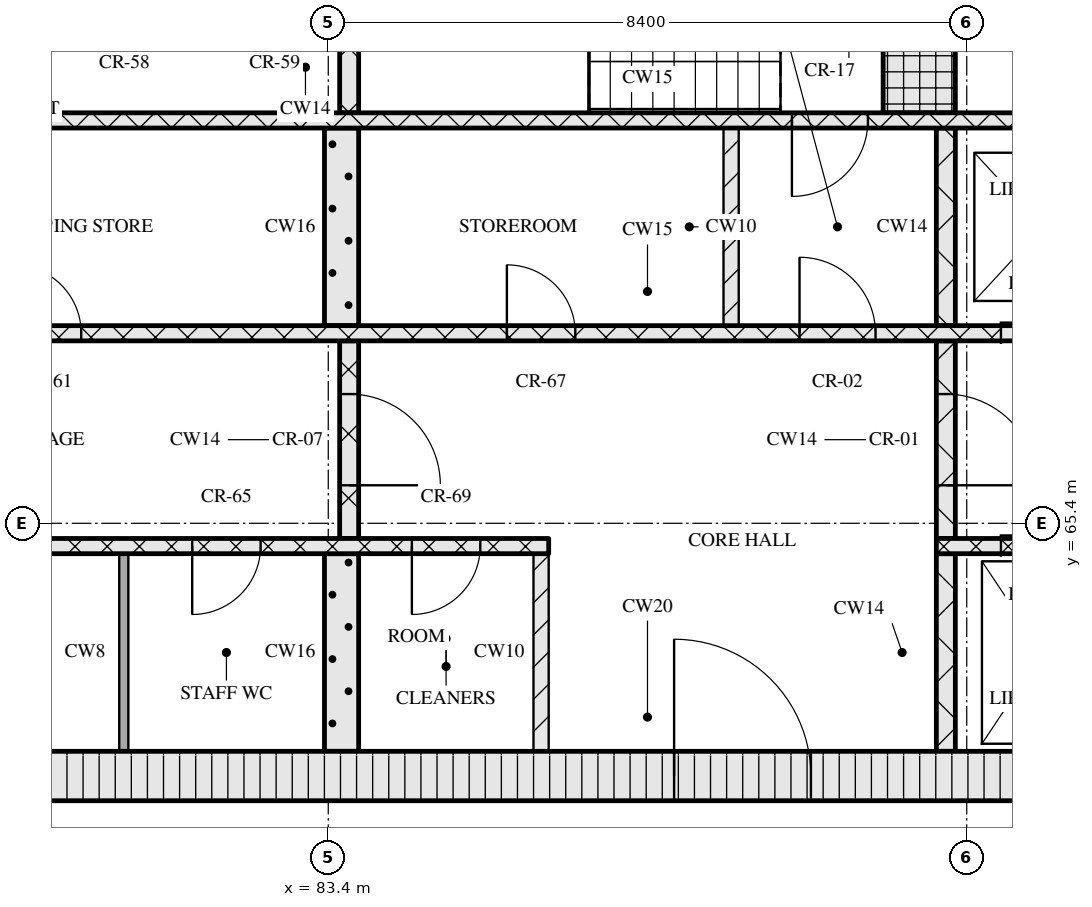
"""IFC4 building model, lengths in metres.
Left out: names, types, materials, properties, quantities, classifications, styles, units other than length and angle.
Written with IfcOpenShell. Run it as: python <this file> out.ifc"""

import sys

from ifc_helpers import new_model, si_unit, direction, frame, frame_2d, origin, place, context, subcontext, project, spatial, rectangle, extrude, element, fill, save


model = new_model("IFC4")
c1 = context("Model", 3, precision=1e-05, world=origin(), true_north=direction((0.0, 1.0)))
c2 = subcontext(c1, "Body", "Model", "MODEL_VIEW")
j1 = project(units=[si_unit("LENGTHUNIT", "METRE"), si_unit("PLANEANGLEUNIT", "RADIAN")], contexts=[c1])
p1 = place(None, origin())
s1 = spatial("IfcSite", under=j1, at=p1, CompositionType="ELEMENT")
p2 = place(p1, origin())
s2 = spatial("IfcBuilding", under=s1, at=p2, CompositionType="ELEMENT")
p3 = place(p2, frame((0.0, 0.0, 223.5)))
s3 = spatial("IfcBuildingStorey", under=s2, at=p3, CompositionType="ELEMENT", Elevation=223.5)
p4 = place(p3, frame((67.15, 62.075, 0.0), z_axis=(0.0, 0.0, 1.0), x_axis=(1.0, 0.0, 0.0)))
e1 = element("IfcWall", 1, at=p4, inside=s3, PredefinedType="SOLIDWALL", context=c2, shape_type="SweptSolid", body=[
    extrude(rectangle(XDim=40.9, YDim=0.65, at=frame_2d((20.45, 0.0))), origin(), (0.0, 0.0, 1.0), 3.32),
])
p5 = place(p4, frame((20.8, 0.0, 0.0)))
e2 = element("IfcOpeningElement", 2, at=p5, cuts=e1, PredefinedType="OPENING", context=c2, shape_type="SweptSolid", body=[
    extrude(rectangle(XDim=1.8, YDim=2.1, at=frame_2d((0.9, 1.05))), frame((0.0, 0.335, 0.0), z_axis=(0.0, -1.0, 0.0), x_axis=(1.0, 0.0, 0.0)), (0.0, 0.0, 1.0), 0.67),
])
p6 = place(p3, frame((80.71, 62.4, 0.0), z_axis=(0.0, 0.0, 1.0), x_axis=(0.0, 1.0, 0.0)))
e3 = element("IfcWall", 3, at=p6, inside=s3, PredefinedType="PARTITIONING", context=c2, shape_type="SweptSolid", body=[
    extrude(rectangle(XDim=2.6, YDim=0.12, at=frame_2d((1.3, 0.0))), origin(), (0.0, 0.0, 1.0), 3.32),
])
p7 = place(p3, frame((83.575, 62.4, 0.0), z_axis=(0.0, 0.0, 1.0), x_axis=(0.0, 1.0, 0.0)))
e4 = element("IfcWall", 4, at=p7, inside=s3, PredefinedType="SOLIDWALL", context=c2, shape_type="SweptSolid", body=[
    extrude(rectangle(XDim=2.6, YDim=0.45, at=frame_2d((1.3, 0.0))), origin(), (0.0, 0.0, 1.0), 3.32),
])
p8 = place(p3, frame((86.2, 62.4, 0.0), z_axis=(0.0, 0.0, 1.0), x_axis=(0.0, 1.0, 0.0)))
e5 = element("IfcWall", 5, at=p8, inside=s3, PredefinedType="PARTITIONING", context=c2, shape_type="SweptSolid", body=[
    extrude(rectangle(XDim=2.6, YDim=0.2, at=frame_2d((1.3, 0.0))), origin(), (0.0, 0.0, 1.0), 3.32),
])
p9 = place(p3, frame((91.525, 62.4, 0.0), z_axis=(0.0, 0.0, 1.0), x_axis=(0.0, 1.0, 0.0)))
e6 = element("IfcWall", 6, at=p9, inside=s3, PredefinedType="SOLIDWALL", context=c2, shape_type="SweptSolid", body=[
    extrude(rectangle(XDim=2.6, YDim=0.25, at=frame_2d((1.3, 0.0))), origin(), (0.0, 0.0, 1.0), 3.32),
])
p10 = place(p3, frame((67.8, 65.1, 0.0), z_axis=(0.0, 0.0, 1.0), x_axis=(1.0, 0.0, 0.0)))
e7 = element("IfcWall", 7, at=p10, inside=s3, PredefinedType="SOLIDWALL", context=c2, shape_type="SweptSolid", body=[
    extrude(rectangle(XDim=18.5, YDim=0.2, at=frame_2d((9.25, 0.0))), origin(), (0.0, 0.0, 1.0), 3.32),
])
p11 = place(p10, frame((7.27, 0.0, 0.0)))
e8 = element("IfcOpeningElement", 8, at=p11, cuts=e7, PredefinedType="OPENING", context=c2, shape_type="SweptSolid", body=[
    extrude(rectangle(XDim=0.9, YDim=2.1, at=frame_2d((0.45, 1.05))), frame((0.0, 0.11, 0.0), z_axis=(0.0, -1.0, 0.0), x_axis=(1.0, 0.0, 0.0)), (0.0, 0.0, 1.0), 0.22),
])
p12 = place(p10, frame((10.1, 0.0, 0.0)))
e9 = element("IfcOpeningElement", 9, at=p12, cuts=e7, PredefinedType="OPENING", context=c2, shape_type="SweptSolid", body=[
    extrude(rectangle(XDim=0.9, YDim=2.1, at=frame_2d((0.45, 1.05))), frame((0.0, 0.11, 0.0), z_axis=(0.0, -1.0, 0.0), x_axis=(1.0, 0.0, 0.0)), (0.0, 0.0, 1.0), 0.22),
])
p13 = place(p10, frame((13.81, 0.0, 0.0)))
e10 = element("IfcOpeningElement", 10, at=p13, cuts=e7, PredefinedType="OPENING", context=c2, shape_type="SweptSolid", body=[
    extrude(rectangle(XDim=0.9, YDim=2.1, at=frame_2d((0.45, 1.05))), frame((0.0, 0.11, 0.0), z_axis=(0.0, -1.0, 0.0), x_axis=(1.0, 0.0, 0.0)), (0.0, 0.0, 1.0), 0.22),
])
p14 = place(p10, frame((16.7, 0.0, 0.0)))
e11 = element("IfcOpeningElement", 11, at=p14, cuts=e7, PredefinedType="OPENING", context=c2, shape_type="SweptSolid", body=[
    extrude(rectangle(XDim=0.9, YDim=2.1, at=frame_2d((0.45, 1.05))), frame((0.0, 0.11, 0.0), z_axis=(0.0, -1.0, 0.0), x_axis=(1.0, 0.0, 0.0)), (0.0, 0.0, 1.0), 0.22),
])
p15 = place(p3, frame((91.4, 65.1, 0.0), z_axis=(0.0, 0.0, 1.0), x_axis=(1.0, 0.0, 0.0)))
e12 = element("IfcWall", 12, at=p15, inside=s3, PredefinedType="SOLIDWALL", context=c2, shape_type="SweptSolid", body=[
    extrude(rectangle(XDim=16.0, YDim=0.2, at=frame_2d((8.0, 0.0))), origin(), (0.0, 0.0, 1.0), 3.32),
])
p16 = place(p15, frame((0.85, 0.0, 0.0)))
e13 = element("IfcOpeningElement", 13, at=p16, cuts=e12, PredefinedType="OPENING", context=c2, shape_type="SweptSolid", body=[
    extrude(rectangle(XDim=1.1, YDim=2.1, at=frame_2d((0.55, 1.05))), frame((0.0, 0.11, 0.0), z_axis=(0.0, -1.0, 0.0), x_axis=(1.0, 0.0, 0.0)), (0.0, 0.0, 1.0), 0.22),
])
p17 = place(p15, frame((3.35, 0.0, 0.0)))
e14 = element("IfcOpeningElement", 14, at=p17, cuts=e12, PredefinedType="OPENING", context=c2, shape_type="SweptSolid", body=[
    extrude(rectangle(XDim=1.1, YDim=2.1, at=frame_2d((0.55, 1.05))), frame((0.0, 0.11, 0.0), z_axis=(0.0, -1.0, 0.0), x_axis=(1.0, 0.0, 0.0)), (0.0, 0.0, 1.0), 0.22),
])
p18 = place(p15, frame((5.85, 0.0, 0.0)))
e15 = element("IfcOpeningElement", 15, at=p18, cuts=e12, PredefinedType="OPENING", context=c2, shape_type="SweptSolid", body=[
    extrude(rectangle(XDim=1.1, YDim=2.1, at=frame_2d((0.55, 1.05))), frame((0.0, 0.11, 0.0), z_axis=(0.0, -1.0, 0.0), x_axis=(1.0, 0.0, 0.0)), (0.0, 0.0, 1.0), 0.22),
])
p19 = place(p15, frame((7.83, 0.0, 0.0)))
e16 = element("IfcOpeningElement", 16, at=p19, cuts=e12, PredefinedType="OPENING", context=c2, shape_type="SweptSolid", body=[
    extrude(rectangle(XDim=0.9, YDim=2.1, at=frame_2d((0.45, 1.05))), frame((0.0, 0.11, 0.0), z_axis=(0.0, -1.0, 0.0), x_axis=(1.0, 0.0, 0.0)), (0.0, 0.0, 1.0), 0.22),
])
p20 = place(p3, frame((83.675, 65.2, 0.0), z_axis=(0.0, 0.0, 1.0), x_axis=(0.0, 1.0, 0.0)))
e17 = element("IfcWall", 17, at=p20, inside=s3, PredefinedType="SOLIDWALL", context=c2, shape_type="SweptSolid", body=[
    extrude(rectangle(XDim=2.6, YDim=0.25, at=frame_2d((1.3, 0.0))), origin(), (0.0, 0.0, 1.0), 3.32),
])
p21 = place(p20, frame((0.7, 0.0, 0.0)))
e18 = element("IfcOpeningElement", 18, at=p21, cuts=e17, PredefinedType="OPENING", context=c2, shape_type="SweptSolid", body=[
    extrude(rectangle(XDim=1.2, YDim=2.1, at=frame_2d((0.6, 1.05))), frame((0.0, 0.135, 0.0), z_axis=(0.0, -1.0, 0.0), x_axis=(1.0, 0.0, 0.0)), (0.0, 0.0, 1.0), 0.27),
])
p22 = place(p3, frame((91.525, 65.2, 0.0), z_axis=(0.0, 0.0, 1.0), x_axis=(0.0, 1.0, 0.0)))
e19 = element("IfcWall", 19, at=p22, inside=s3, PredefinedType="SOLIDWALL", context=c2, shape_type="SweptSolid", body=[
    extrude(rectangle(XDim=2.6, YDim=0.25, at=frame_2d((1.3, 0.0))), origin(), (0.0, 0.0, 1.0), 3.32),
])
p23 = place(p22, frame((0.7, 0.0, 0.0)))
e20 = element("IfcOpeningElement", 20, at=p23, cuts=e19, PredefinedType="OPENING", context=c2, shape_type="SweptSolid", body=[
    extrude(rectangle(XDim=1.2, YDim=2.1, at=frame_2d((0.6, 1.05))), frame((0.0, 0.135, 0.0), z_axis=(0.0, -1.0, 0.0), x_axis=(1.0, 0.0, 0.0)), (0.0, 0.0, 1.0), 0.27),
])
p24 = place(p3, frame((76.05, 67.9, 0.0), z_axis=(0.0, 0.0, 1.0), x_axis=(1.0, 0.0, 0.0)))
e21 = element("IfcWall", 21, at=p24, inside=s3, PredefinedType="SOLIDWALL", context=c2, shape_type="SweptSolid", body=[
    extrude(rectangle(XDim=23.1, YDim=0.2, at=frame_2d((11.55, 0.0))), origin(), (0.0, 0.0, 1.0), 3.32),
])
p25 = place(p24, frame((3.2, 0.0, 0.0)))
e22 = element("IfcOpeningElement", 22, at=p25, cuts=e21, PredefinedType="OPENING", context=c2, shape_type="SweptSolid", body=[
    extrude(rectangle(XDim=0.9, YDim=2.1, at=frame_2d((0.45, 1.05))), frame((0.0, 0.11, 0.0), z_axis=(0.0, -1.0, 0.0), x_axis=(1.0, 0.0, 0.0)), (0.0, 0.0, 1.0), 0.22),
])
p26 = place(p24, frame((9.7, 0.0, 0.0)))
e23 = element("IfcOpeningElement", 23, at=p26, cuts=e21, PredefinedType="OPENING", context=c2, shape_type="SweptSolid", body=[
    extrude(rectangle(XDim=0.9, YDim=2.1, at=frame_2d((0.45, 1.05))), frame((0.0, 0.11, 0.0), z_axis=(0.0, -1.0, 0.0), x_axis=(1.0, 0.0, 0.0)), (0.0, 0.0, 1.0), 0.22),
])
p27 = place(p24, frame((13.55, 0.0, 0.0)))
e24 = element("IfcOpeningElement", 24, at=p27, cuts=e21, PredefinedType="OPENING", context=c2, shape_type="SweptSolid", body=[
    extrude(rectangle(XDim=1.0, YDim=2.1, at=frame_2d((0.5, 1.05))), frame((0.0, 0.11, 0.0), z_axis=(0.0, -1.0, 0.0), x_axis=(1.0, 0.0, 0.0)), (0.0, 0.0, 1.0), 0.22),
])
p28 = place(p24, frame((16.2, 0.0, 0.0)))
e25 = element("IfcOpeningElement", 25, at=p28, cuts=e21, PredefinedType="OPENING", context=c2, shape_type="SweptSolid", body=[
    extrude(rectangle(XDim=1.1, YDim=2.1, at=frame_2d((0.55, 1.05))), frame((0.0, 0.11, 0.0), z_axis=(0.0, -1.0, 0.0), x_axis=(1.0, 0.0, 0.0)), (0.0, 0.0, 1.0), 0.22),
])
p29 = place(p24, frame((18.7, 0.0, 0.0)))
e26 = element("IfcOpeningElement", 26, at=p29, cuts=e21, PredefinedType="OPENING", context=c2, shape_type="SweptSolid", body=[
    extrude(rectangle(XDim=1.1, YDim=2.1, at=frame_2d((0.55, 1.05))), frame((0.0, 0.11, 0.0), z_axis=(0.0, -1.0, 0.0), x_axis=(1.0, 0.0, 0.0)), (0.0, 0.0, 1.0), 0.22),
])
p30 = place(p24, frame((21.2, 0.0, 0.0)))
e27 = element("IfcOpeningElement", 27, at=p30, cuts=e21, PredefinedType="OPENING", context=c2, shape_type="SweptSolid", body=[
    extrude(rectangle(XDim=1.1, YDim=2.1, at=frame_2d((0.55, 1.05))), frame((0.0, 0.11, 0.0), z_axis=(0.0, -1.0, 0.0), x_axis=(1.0, 0.0, 0.0)), (0.0, 0.0, 1.0), 0.22),
])
p31 = place(p3, frame((83.575, 68.0, 0.0), z_axis=(0.0, 0.0, 1.0), x_axis=(0.0, 1.0, 0.0)))
e28 = element("IfcWall", 28, at=p31, inside=s3, PredefinedType="SOLIDWALL", context=c2, shape_type="SweptSolid", body=[
    extrude(rectangle(XDim=2.6, YDim=0.45, at=frame_2d((1.3, 0.0))), origin(), (0.0, 0.0, 1.0), 3.32),
])
p32 = place(p3, frame((88.7, 68.0, 0.0), z_axis=(0.0, 0.0, 1.0), x_axis=(0.0, 1.0, 0.0)))
e29 = element("IfcWall", 29, at=p32, inside=s3, PredefinedType="PARTITIONING", context=c2, shape_type="SweptSolid", body=[
    extrude(rectangle(XDim=2.6, YDim=0.2, at=frame_2d((1.3, 0.0))), origin(), (0.0, 0.0, 1.0), 3.32),
])
p33 = place(p3, frame((91.525, 68.0, 0.0), z_axis=(0.0, 0.0, 1.0), x_axis=(0.0, 1.0, 0.0)))
e30 = element("IfcWall", 30, at=p33, inside=s3, PredefinedType="SOLIDWALL", context=c2, shape_type="SweptSolid", body=[
    extrude(rectangle(XDim=2.6, YDim=0.25, at=frame_2d((1.3, 0.0))), origin(), (0.0, 0.0, 1.0), 3.32),
])
p34 = place(p3, frame((67.8, 70.7, 0.0), z_axis=(0.0, 0.0, 1.0), x_axis=(1.0, 0.0, 0.0)))
e31 = element("IfcWall", 31, at=p34, inside=s3, PredefinedType="SOLIDWALL", context=c2, shape_type="SweptSolid", body=[
    extrude(rectangle(XDim=39.6, YDim=0.2, at=frame_2d((19.8, 0.0))), origin(), (0.0, 0.0, 1.0), 3.32),
])
p35 = place(p34, frame((0.65, 0.0, 0.0)))
e32 = element("IfcOpeningElement", 32, at=p35, cuts=e31, PredefinedType="OPENING", context=c2, shape_type="SweptSolid", body=[
    extrude(rectangle(XDim=1.1, YDim=2.1, at=frame_2d((0.55, 1.05))), frame((0.0, 0.11, 0.0), z_axis=(0.0, -1.0, 0.0), x_axis=(1.0, 0.0, 0.0)), (0.0, 0.0, 1.0), 0.22),
])
p36 = place(p34, frame((3.25, 0.0, 0.0)))
e33 = element("IfcOpeningElement", 33, at=p36, cuts=e31, PredefinedType="OPENING", context=c2, shape_type="SweptSolid", body=[
    extrude(rectangle(XDim=1.1, YDim=2.1, at=frame_2d((0.55, 1.05))), frame((0.0, 0.11, 0.0), z_axis=(0.0, -1.0, 0.0), x_axis=(1.0, 0.0, 0.0)), (0.0, 0.0, 1.0), 0.22),
])
p37 = place(p34, frame((5.9, 0.0, 0.0)))
e34 = element("IfcOpeningElement", 34, at=p37, cuts=e31, PredefinedType="OPENING", context=c2, shape_type="SweptSolid", body=[
    extrude(rectangle(XDim=1.0, YDim=2.1, at=frame_2d((0.5, 1.05))), frame((0.0, 0.11, 0.0), z_axis=(0.0, -1.0, 0.0), x_axis=(1.0, 0.0, 0.0)), (0.0, 0.0, 1.0), 0.22),
])
p38 = place(p34, frame((21.7, 0.0, 0.0)))
e35 = element("IfcOpeningElement", 35, at=p38, cuts=e31, PredefinedType="OPENING", context=c2, shape_type="SweptSolid", body=[
    extrude(rectangle(XDim=1.0, YDim=2.1, at=frame_2d((0.5, 1.05))), frame((0.0, 0.11, 0.0), z_axis=(0.0, -1.0, 0.0), x_axis=(1.0, 0.0, 0.0)), (0.0, 0.0, 1.0), 0.22),
])
p39 = place(p34, frame((32.7, 0.0, 0.0)))
e36 = element("IfcOpeningElement", 36, at=p39, cuts=e31, PredefinedType="OPENING", context=c2, shape_type="SweptSolid", body=[
    extrude(rectangle(XDim=1.0, YDim=2.1, at=frame_2d((0.5, 1.05))), frame((0.0, 0.11, 0.0), z_axis=(0.0, -1.0, 0.0), x_axis=(1.0, 0.0, 0.0)), (0.0, 0.0, 1.0), 0.22),
])
p40 = place(p34, frame((35.25, 0.0, 0.0)))
e37 = element("IfcOpeningElement", 37, at=p40, cuts=e31, PredefinedType="OPENING", context=c2, shape_type="SweptSolid", body=[
    extrude(rectangle(XDim=1.1, YDim=2.1, at=frame_2d((0.55, 1.05))), frame((0.0, 0.11, 0.0), z_axis=(0.0, -1.0, 0.0), x_axis=(1.0, 0.0, 0.0)), (0.0, 0.0, 1.0), 0.22),
])
p41 = place(p34, frame((37.85, 0.0, 0.0)))
e38 = element("IfcOpeningElement", 38, at=p41, cuts=e31, PredefinedType="OPENING", context=c2, shape_type="SweptSolid", body=[
    extrude(rectangle(XDim=1.1, YDim=2.1, at=frame_2d((0.55, 1.05))), frame((0.0, 0.11, 0.0), z_axis=(0.0, -1.0, 0.0), x_axis=(1.0, 0.0, 0.0)), (0.0, 0.0, 1.0), 0.22),
])
p42 = place(p3, frame((83.675, 70.8, 0.0), z_axis=(0.0, 0.0, 1.0), x_axis=(0.0, 1.0, 0.0)))
e39 = element("IfcWall", 39, at=p42, inside=s3, PredefinedType="SOLIDWALL", context=c2, shape_type="SweptSolid", body=[
    extrude(rectangle(XDim=1.2, YDim=0.25, at=frame_2d((0.6, 0.0))), origin(), (0.0, 0.0, 1.0), 3.32),
])
p43 = place(p3, frame((91.175, 70.8, 0.0), z_axis=(0.0, 0.0, 1.0), x_axis=(0.0, 1.0, 0.0)))
e40 = element("IfcWall", 40, at=p43, inside=s3, PredefinedType="SOLIDWALL", context=c2, shape_type="SweptSolid", body=[
    extrude(rectangle(XDim=1.2, YDim=0.95, at=frame_2d((0.6, 0.0))), origin(), (0.0, 0.0, 1.0), 3.32),
])
p44 = place(p5, origin())
e41 = element("IfcDoor", 41, at=p44, inside=s3, OperationType="DOUBLE_DOOR_SINGLE_SWING", PredefinedType="DOOR", context=c2, shape_type="SweptSolid", body=[
    extrude(rectangle(XDim=1.8, YDim=2.1, at=frame_2d((0.9, 1.05))), frame((0.0, 0.025, 0.0), z_axis=(0.0, -1.0, 0.0), x_axis=(1.0, 0.0, 0.0)), (0.0, 0.0, 1.0), 0.05),
])
fill(e2, e41)
p45 = place(p13, origin())
e42 = element("IfcDoor", 42, at=p45, inside=s3, OperationType="SINGLE_SWING_RIGHT", PredefinedType="DOOR", context=c2, shape_type="SweptSolid", body=[
    extrude(rectangle(XDim=0.9, YDim=2.1, at=frame_2d((0.45, 1.05))), frame((0.0, 0.025, 0.0), z_axis=(0.0, -1.0, 0.0), x_axis=(1.0, 0.0, 0.0)), (0.0, 0.0, 1.0), 0.05),
])
fill(e10, e42)
p46 = place(p14, origin())
e43 = element("IfcDoor", 43, at=p46, inside=s3, OperationType="SINGLE_SWING_RIGHT", PredefinedType="DOOR", context=c2, shape_type="SweptSolid", body=[
    extrude(rectangle(XDim=0.9, YDim=2.1, at=frame_2d((0.45, 1.05))), frame((0.0, 0.025, 0.0), z_axis=(0.0, -1.0, 0.0), x_axis=(1.0, 0.0, 0.0)), (0.0, 0.0, 1.0), 0.05),
])
fill(e11, e43)
p47 = place(p16, origin())
e44 = element("IfcDoor", 44, at=p47, inside=s3, OperationType="SLIDING_TO_LEFT", PredefinedType="DOOR", context=c2, shape_type="SweptSolid", body=[
    extrude(rectangle(XDim=1.1, YDim=2.1, at=frame_2d((0.55, 1.05))), frame((0.0, 0.025, 0.0), z_axis=(0.0, -1.0, 0.0), x_axis=(1.0, 0.0, 0.0)), (0.0, 0.0, 1.0), 0.05),
])
fill(e13, e44)
p48 = place(p21, origin())
e45 = element("IfcDoor", 45, at=p48, inside=s3, OperationType="SINGLE_SWING_RIGHT", PredefinedType="DOOR", context=c2, shape_type="SweptSolid", body=[
    extrude(rectangle(XDim=1.2, YDim=2.1, at=frame_2d((0.6, 1.05))), frame((0.0, 0.025, 0.0), z_axis=(0.0, -1.0, 0.0), x_axis=(1.0, 0.0, 0.0)), (0.0, 0.0, 1.0), 0.05),
])
fill(e18, e45)
p49 = place(p23, origin())
e46 = element("IfcDoor", 46, at=p49, inside=s3, OperationType="SINGLE_SWING_RIGHT", PredefinedType="DOOR", context=c2, shape_type="SweptSolid", body=[
    extrude(rectangle(XDim=1.2, YDim=2.1, at=frame_2d((0.6, 1.05))), frame((0.0, 0.025, 0.0), z_axis=(0.0, -1.0, 0.0), x_axis=(1.0, 0.0, 0.0)), (0.0, 0.0, 1.0), 0.05),
])
fill(e20, e46)
p50 = place(p25, origin())
e47 = element("IfcDoor", 47, at=p50, inside=s3, OperationType="SINGLE_SWING_LEFT", PredefinedType="DOOR", context=c2, shape_type="SweptSolid", body=[
    extrude(rectangle(XDim=0.9, YDim=2.1, at=frame_2d((0.45, 1.05))), frame((0.0, 0.025, 0.0), z_axis=(0.0, -1.0, 0.0), x_axis=(1.0, 0.0, 0.0)), (0.0, 0.0, 1.0), 0.05),
])
fill(e22, e47)
p51 = place(p26, origin())
e48 = element("IfcDoor", 48, at=p51, inside=s3, OperationType="SINGLE_SWING_LEFT", PredefinedType="DOOR", context=c2, shape_type="SweptSolid", body=[
    extrude(rectangle(XDim=0.9, YDim=2.1, at=frame_2d((0.45, 1.05))), frame((0.0, 0.025, 0.0), z_axis=(0.0, -1.0, 0.0), x_axis=(1.0, 0.0, 0.0)), (0.0, 0.0, 1.0), 0.05),
])
fill(e23, e48)
p52 = place(p27, origin())
e49 = element("IfcDoor", 49, at=p52, inside=s3, OperationType="SINGLE_SWING_LEFT", PredefinedType="DOOR", context=c2, shape_type="SweptSolid", body=[
    extrude(rectangle(XDim=1.0, YDim=2.1, at=frame_2d((0.5, 1.05))), frame((0.0, 0.025, 0.0), z_axis=(0.0, -1.0, 0.0), x_axis=(1.0, 0.0, 0.0)), (0.0, 0.0, 1.0), 0.05),
])
fill(e24, e49)
p53 = place(p28, origin())
e50 = element("IfcDoor", 50, at=p53, inside=s3, OperationType="SLIDING_TO_RIGHT", PredefinedType="DOOR", context=c2, shape_type="SweptSolid", body=[
    extrude(rectangle(XDim=1.1, YDim=2.1, at=frame_2d((0.55, 1.05))), frame((0.0, 0.025, 0.0), z_axis=(0.0, -1.0, 0.0), x_axis=(1.0, 0.0, 0.0)), (0.0, 0.0, 1.0), 0.05),
])
fill(e25, e50)
p54 = place(p38, origin())
e51 = element("IfcDoor", 51, at=p54, inside=s3, OperationType="SINGLE_SWING_RIGHT", PredefinedType="DOOR", context=c2, shape_type="SweptSolid", body=[
    extrude(rectangle(XDim=1.0, YDim=2.1, at=frame_2d((0.5, 1.05))), frame((0.0, 0.025, 0.0), z_axis=(0.0, -1.0, 0.0), x_axis=(1.0, 0.0, 0.0)), (0.0, 0.0, 1.0), 0.05),
])
fill(e35, e51)
save(model, sys.argv[1])
